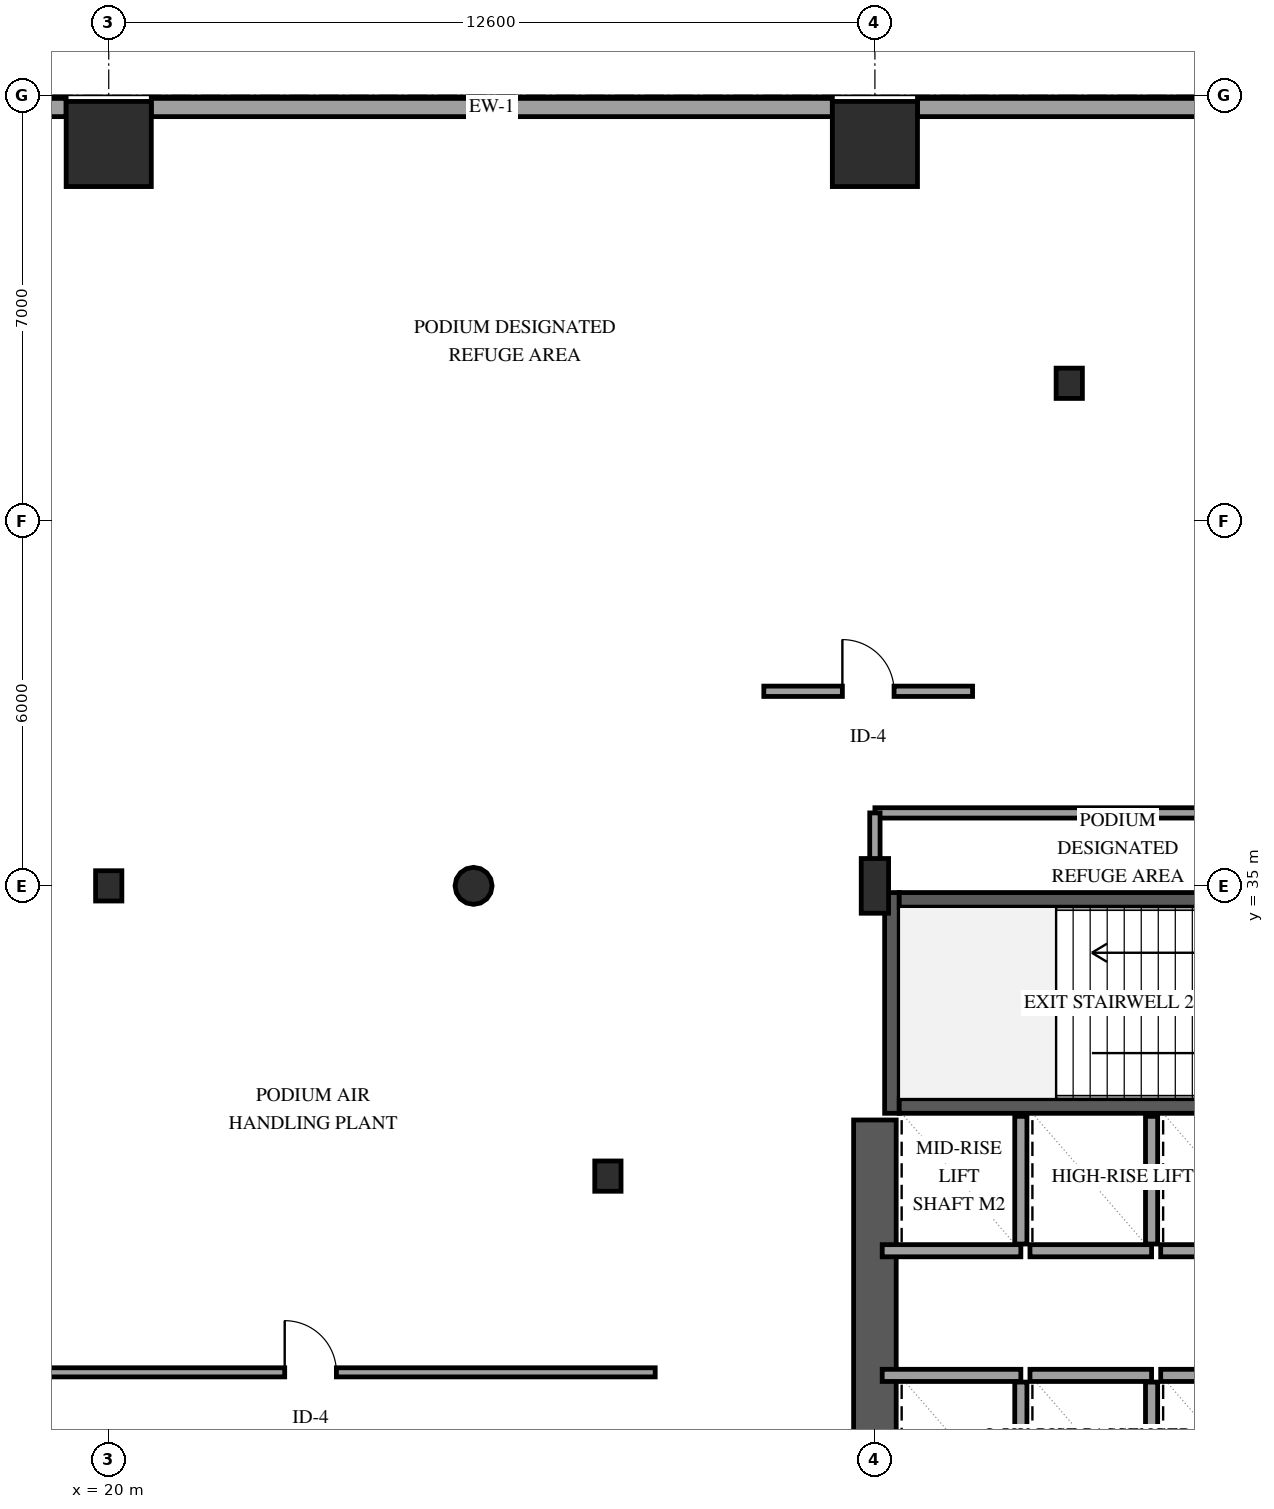
"""IFC4 building model, lengths in metres.
Left out: names, types, materials, properties, quantities, classifications, styles, units other than length and angle.
Written with IfcOpenShell. Run it as: python <this file> out.ifc"""

import sys

from ifc_helpers import new_model, si_unit, direction, frame, frame_2d, origin, origin_2d, place, context, subcontext, project, spatial, rectangle, hollow_circle, i_section, extrude, element, fill, save


model = new_model("IFC4")
c1 = context("Model", 3, precision=1e-05, world=origin(), true_north=direction((0.0, 1.0)))
c2 = subcontext(c1, "Body", "Model", "MODEL_VIEW")
j1 = project(units=[si_unit("LENGTHUNIT", "METRE"), si_unit("PLANEANGLEUNIT", "RADIAN")], contexts=[c1])
p1 = place(None, origin())
s1 = spatial("IfcSite", under=j1, at=p1, CompositionType="ELEMENT")
p2 = place(p1, origin())
s2 = spatial("IfcBuilding", under=s1, at=p2, CompositionType="ELEMENT")
p3 = place(p2, frame((0.0, 0.0, 25.2)))
s3 = spatial("IfcBuildingStorey", under=s2, at=p3, CompositionType="ELEMENT", Elevation=25.2)
p4 = place(p3, frame((32.88, 31.26, 0.0), z_axis=(0.0, 0.0, 1.0), x_axis=(0.0, 1.0, 0.0)))
e1 = element("IfcWall", 1, at=p4, inside=s3, PredefinedType="SHEAR", context=c2, shape_type="SweptSolid", body=[
    extrude(rectangle(XDim=3.63, YDim=0.24, at=frame_2d((1.815, 0.0))), origin(), (0.0, 0.0, 1.0), 5.4),
])
for number, where, z_axis, x_axis in (
    (2, (33.0, 31.38, 0.0), (0.0, 0.0, 1.0), (1.0, 0.0, 0.0)),
    (3, (33.0, 34.77, 0.0), (0.0, 0.0, 1.0), (1.0, 0.0, 0.0)),
):
    element("IfcWall", number, at=place(p3, frame(where, z_axis=z_axis, x_axis=x_axis)), inside=s3, PredefinedType="SHEAR", context=c2, shape_type="SweptSolid", body=[
        extrude(rectangle(XDim=8.0, YDim=0.24, at=frame_2d((4.0, 0.0))), origin(), (0.0, 0.0, 1.0), 5.4),
    ])
p5 = place(p3, frame((32.6, 18.85, 0.0), z_axis=(0.0, 0.0, 1.0), x_axis=(0.0, 1.0, 0.0)))
e4 = element("IfcWall", 4, at=p5, inside=s3, PredefinedType="SHEAR", context=c2, shape_type="SweptSolid", body=[
    extrude(rectangle(XDim=12.3, YDim=0.7, at=frame_2d((6.15, 0.0))), origin(), (0.0, 0.0, 1.0), 5.4),
])
p6 = place(p3, frame((32.6, 35.0, 0.0), z_axis=(0.0, 0.0, 1.0), x_axis=(1.0, 0.0, 0.0)))
e5 = element("IfcColumn", 5, at=p6, inside=s3, PredefinedType="PILASTER", context=c2, shape_type="SweptSolid", body=[
    extrude(rectangle(XDim=0.45, YDim=0.9, at=origin_2d()), origin(), (0.0, 0.0, 1.0), 5.1),
])
p7 = place(p3, frame((20.0, 35.0, 0.0), z_axis=(0.0, 0.0, 1.0), x_axis=(1.0, 0.0, 0.0)))
e6 = element("IfcColumn", 6, at=p7, inside=s3, PredefinedType="COLUMN", context=c2, shape_type="SweptSolid", body=[
    extrude(i_section(OverallWidth=0.432, OverallDepth=0.498, WebThickness=0.056, FlangeThickness=0.089, FilletRadius=0.038, at=origin_2d()), origin(), (0.0, 0.0, 1.0), 5.1),
])
for number, where, z_axis, x_axis in (
    (7, (20.0, 47.2, 0.0), (0.0, 0.0, 1.0), (1.0, 0.0, 0.0)),
    (8, (32.6, 47.2, 0.0), (0.0, 0.0, 1.0), (1.0, 0.0, 0.0)),
):
    element("IfcColumn", number, at=place(p3, frame(where, z_axis=z_axis, x_axis=x_axis)), inside=s3, PredefinedType="COLUMN", context=c2, shape_type="SweptSolid", body=[
        extrude(rectangle(XDim=1.4, YDim=1.4, at=origin_2d()), origin(), (0.0, 0.0, 1.0), 5.1),
    ])
p8 = place(p3, frame((26.0, 35.0, 0.0), z_axis=(0.0, 0.0, 1.0), x_axis=(1.0, 0.0, 0.0)))
e9 = element("IfcColumn", 9, at=p8, inside=s3, PredefinedType="COLUMN", context=c2, shape_type="SweptSolid", body=[
    extrude(hollow_circle(Radius=0.305, WallThickness=0.022, at=origin_2d()), origin(), (0.0, 0.0, 1.0), 5.07),
])
for number, where, z_axis, x_axis in (
    (10, (35.796, 43.265, 0.0), (0.0, 0.0, 1.0), (1.0, 0.0, 0.0)),
    (11, (28.209, 30.227, 0.0), (0.0, 0.0, 1.0), (1.0, 0.0, 0.0)),
):
    element("IfcColumn", number, at=place(p3, frame(where, z_axis=z_axis, x_axis=x_axis)), inside=s3, PredefinedType="COLUMN", context=c2, shape_type="SweptSolid", body=[
        extrude(i_section(OverallWidth=0.432, OverallDepth=0.498, WebThickness=0.056, FlangeThickness=0.089, FilletRadius=0.038, at=origin_2d()), origin(), (0.0, 0.0, 1.0), 5.1),
    ])
p9 = place(p3, frame((1.5, 47.8, 0.0), z_axis=(0.0, 0.0, 1.0), x_axis=(1.0, 0.0, 0.0)))
e12 = element("IfcWall", 12, at=p9, inside=s3, PredefinedType="SOLIDWALL", context=c2, shape_type="SweptSolid", body=[
    extrude(rectangle(XDim=17.8, YDim=0.3, at=frame_2d((8.9, 0.0))), origin(), (0.0, 0.0, 1.0), 4.156),
])
p10 = place(p3, frame((20.7, 47.8, 0.0), z_axis=(0.0, 0.0, 1.0), x_axis=(1.0, 0.0, 0.0)))
e13 = element("IfcWall", 13, at=p10, inside=s3, PredefinedType="SOLIDWALL", context=c2, shape_type="SweptSolid", body=[
    extrude(rectangle(XDim=11.2, YDim=0.3, at=frame_2d((5.6, 0.0))), origin(), (0.0, 0.0, 1.0), 4.156),
])
p11 = place(p3, frame((33.3, 47.8, 0.0), z_axis=(0.0, 0.0, 1.0), x_axis=(1.0, 0.0, 0.0)))
e14 = element("IfcWall", 14, at=p11, inside=s3, PredefinedType="SOLIDWALL", context=c2, shape_type="SweptSolid", body=[
    extrude(rectangle(XDim=10.6, YDim=0.3, at=frame_2d((5.3, 0.0))), origin(), (0.0, 0.0, 1.0), 4.156),
])
p12 = place(p3, frame((32.72, 26.95, 0.0), z_axis=(0.0, 0.0, 1.0), x_axis=(1.0, 0.0, 0.0)))
e15 = element("IfcWall", 15, at=p12, inside=s3, PredefinedType="SOLIDWALL", context=c2, shape_type="SweptSolid", body=[
    extrude(rectangle(XDim=2.28, YDim=0.2, at=frame_2d((1.14, 0.0))), origin(), (0.0, 0.0, 1.0), 5.1),
])
p13 = place(p3, frame((35.0, 24.76, 0.0), z_axis=(0.0, 0.0, 1.0), x_axis=(0.0, 1.0, 0.0)))
e16 = element("IfcWall", 16, at=p13, inside=s3, PredefinedType="SOLIDWALL", context=c2, shape_type="SweptSolid", body=[
    extrude(rectangle(XDim=2.08, YDim=0.2, at=frame_2d((1.04, 0.0))), origin(), (0.0, 0.0, 1.0), 5.1),
])
p14 = place(p3, frame((35.15, 26.95, 0.0), z_axis=(0.0, 0.0, 1.0), x_axis=(1.0, 0.0, 0.0)))
e17 = element("IfcWall", 17, at=p14, inside=s3, PredefinedType="SOLIDWALL", context=c2, shape_type="SweptSolid", body=[
    extrude(rectangle(XDim=2.0, YDim=0.2, at=frame_2d((1.0, 0.0))), origin(), (0.0, 0.0, 1.0), 5.1),
])
p15 = place(p3, frame((37.15, 24.76, 0.0), z_axis=(0.0, 0.0, 1.0), x_axis=(0.0, 1.0, 0.0)))
e18 = element("IfcWall", 18, at=p15, inside=s3, PredefinedType="SOLIDWALL", context=c2, shape_type="SweptSolid", body=[
    extrude(rectangle(XDim=2.08, YDim=0.2, at=frame_2d((1.04, 0.0))), origin(), (0.0, 0.0, 1.0), 5.1),
])
p16 = place(p3, frame((37.3, 26.95, 0.0), z_axis=(0.0, 0.0, 1.0), x_axis=(1.0, 0.0, 0.0)))
e19 = element("IfcWall", 19, at=p16, inside=s3, PredefinedType="SOLIDWALL", context=c2, shape_type="SweptSolid", body=[
    extrude(rectangle(XDim=2.0, YDim=0.2, at=frame_2d((1.0, 0.0))), origin(), (0.0, 0.0, 1.0), 5.1),
])
p17 = place(p3, frame((32.72, 29.0, 0.0), z_axis=(0.0, 0.0, 1.0), x_axis=(1.0, 0.0, 0.0)))
e20 = element("IfcWall", 20, at=p17, inside=s3, PredefinedType="SOLIDWALL", context=c2, shape_type="SweptSolid", body=[
    extrude(rectangle(XDim=2.28, YDim=0.2, at=frame_2d((1.14, 0.0))), origin(), (0.0, 0.0, 1.0), 5.1),
])
p18 = place(p3, frame((35.0, 29.11, 0.0), z_axis=(0.0, 0.0, 1.0), x_axis=(0.0, 1.0, 0.0)))
e21 = element("IfcWall", 21, at=p18, inside=s3, PredefinedType="SOLIDWALL", context=c2, shape_type="SweptSolid", body=[
    extrude(rectangle(XDim=2.1, YDim=0.2, at=frame_2d((1.05, 0.0))), origin(), (0.0, 0.0, 1.0), 5.1),
])
p19 = place(p3, frame((35.15, 29.0, 0.0), z_axis=(0.0, 0.0, 1.0), x_axis=(1.0, 0.0, 0.0)))
e22 = element("IfcWall", 22, at=p19, inside=s3, PredefinedType="SOLIDWALL", context=c2, shape_type="SweptSolid", body=[
    extrude(rectangle(XDim=2.0, YDim=0.2, at=frame_2d((1.0, 0.0))), origin(), (0.0, 0.0, 1.0), 5.1),
])
p20 = place(p3, frame((37.15, 29.11, 0.0), z_axis=(0.0, 0.0, 1.0), x_axis=(0.0, 1.0, 0.0)))
e23 = element("IfcWall", 23, at=p20, inside=s3, PredefinedType="SOLIDWALL", context=c2, shape_type="SweptSolid", body=[
    extrude(rectangle(XDim=2.1, YDim=0.2, at=frame_2d((1.05, 0.0))), origin(), (0.0, 0.0, 1.0), 5.1),
])
p21 = place(p3, frame((37.3, 29.0, 0.0), z_axis=(0.0, 0.0, 1.0), x_axis=(1.0, 0.0, 0.0)))
e24 = element("IfcWall", 24, at=p21, inside=s3, PredefinedType="SOLIDWALL", context=c2, shape_type="SweptSolid", body=[
    extrude(rectangle(XDim=2.0, YDim=0.2, at=frame_2d((1.0, 0.0))), origin(), (0.0, 0.0, 1.0), 5.1),
])
p22 = place(p3, frame((44.53, 36.2, 0.0), z_axis=(0.0, 0.0, 1.0), x_axis=(-1.0, 0.0, 0.0)))
e25 = element("IfcWall", 25, at=p22, inside=s3, PredefinedType="PARTITIONING", context=c2, shape_type="SweptSolid", body=[
    extrude(rectangle(XDim=11.93, YDim=0.17, at=frame_2d((5.965, 0.0))), origin(), (0.0, 0.0, 1.0), 5.1),
])
p23 = place(p22, frame((3.7, 0.0, 0.0)))
e26 = element("IfcOpeningElement", 26, at=p23, cuts=e25, PredefinedType="OPENING", context=c2, shape_type="SweptSolid", body=[
    extrude(rectangle(XDim=0.92, YDim=2.12, at=frame_2d((0.46, 1.06))), frame((0.0, 0.095, 0.0), z_axis=(0.0, -1.0, 0.0), x_axis=(1.0, 0.0, 0.0)), (0.0, 0.0, 1.0), 0.19),
])
p24 = place(p3, frame((32.6, 36.2, 0.0), z_axis=(0.0, 0.0, 1.0), x_axis=(0.0, -1.0, 0.0)))
e27 = element("IfcWall", 27, at=p24, inside=s3, PredefinedType="PARTITIONING", context=c2, shape_type="SweptSolid", body=[
    extrude(rectangle(XDim=1.13, YDim=0.17, at=frame_2d((0.565, 0.0))), origin(), (0.0, 0.0, 1.0), 4.222),
])
p25 = place(p3, frame((17.65, 27.0, 0.0), z_axis=(0.0, 0.0, 1.0), x_axis=(1.0, 0.0, 0.0)))
e28 = element("IfcWall", 28, at=p25, inside=s3, PredefinedType="PARTITIONING", context=c2, shape_type="SweptSolid", body=[
    extrude(rectangle(XDim=11.337, YDim=0.15, at=frame_2d((5.668, 0.0))), origin(), (0.0, 0.0, 1.0), 5.1),
])
p26 = place(p25, frame((5.244, 0.0, 0.0)))
e29 = element("IfcOpeningElement", 29, at=p26, cuts=e28, PredefinedType="OPENING", context=c2, shape_type="SweptSolid", body=[
    extrude(rectangle(XDim=0.85, YDim=2.1, at=frame_2d((0.425, 1.05))), frame((0.0, 0.085, 0.0), z_axis=(0.0, -1.0, 0.0), x_axis=(1.0, 0.0, 0.0)), (0.0, 0.0, 1.0), 0.17),
])
p27 = place(p3, frame((30.773, 38.2, 0.0), z_axis=(0.0, 0.0, 1.0), x_axis=(1.0, 0.0, 0.0)))
e30 = element("IfcWall", 30, at=p27, inside=s3, PredefinedType="PARTITIONING", context=c2, shape_type="SweptSolid", body=[
    extrude(rectangle(XDim=3.433, YDim=0.17, at=frame_2d((1.717, 0.0))), origin(), (0.0, 0.0, 1.0), 5.1),
])
p28 = place(p27, frame((1.292, 0.0, 0.0)))
e31 = element("IfcOpeningElement", 31, at=p28, cuts=e30, PredefinedType="OPENING", context=c2, shape_type="SweptSolid", body=[
    extrude(rectangle(XDim=0.85, YDim=2.1, at=frame_2d((0.425, 1.05))), frame((0.0, 0.095, 0.0), z_axis=(0.0, -1.0, 0.0), x_axis=(1.0, 0.0, 0.0)), (0.0, 0.0, 1.0), 0.19),
])
p29 = place(p26, origin())
e32 = element("IfcDoor", 32, at=p29, inside=s3, OperationType="SINGLE_SWING_LEFT", PredefinedType="DOOR", context=c2, shape_type="SweptSolid", body=[
    extrude(rectangle(XDim=0.85, YDim=2.1, at=frame_2d((0.425, 1.05))), frame((0.0, 0.025, 0.0), z_axis=(0.0, -1.0, 0.0), x_axis=(1.0, 0.0, 0.0)), (0.0, 0.0, 1.0), 0.05),
])
fill(e29, e32)
p30 = place(p28, origin())
e33 = element("IfcDoor", 33, at=p30, inside=s3, OperationType="SINGLE_SWING_LEFT", PredefinedType="DOOR", context=c2, shape_type="SweptSolid", body=[
    extrude(rectangle(XDim=0.85, YDim=2.1, at=frame_2d((0.425, 1.05))), frame((0.0, 0.025, 0.0), z_axis=(0.0, -1.0, 0.0), x_axis=(1.0, 0.0, 0.0)), (0.0, 0.0, 1.0), 0.05),
])
fill(e31, e33)
save(model, sys.argv[1])
